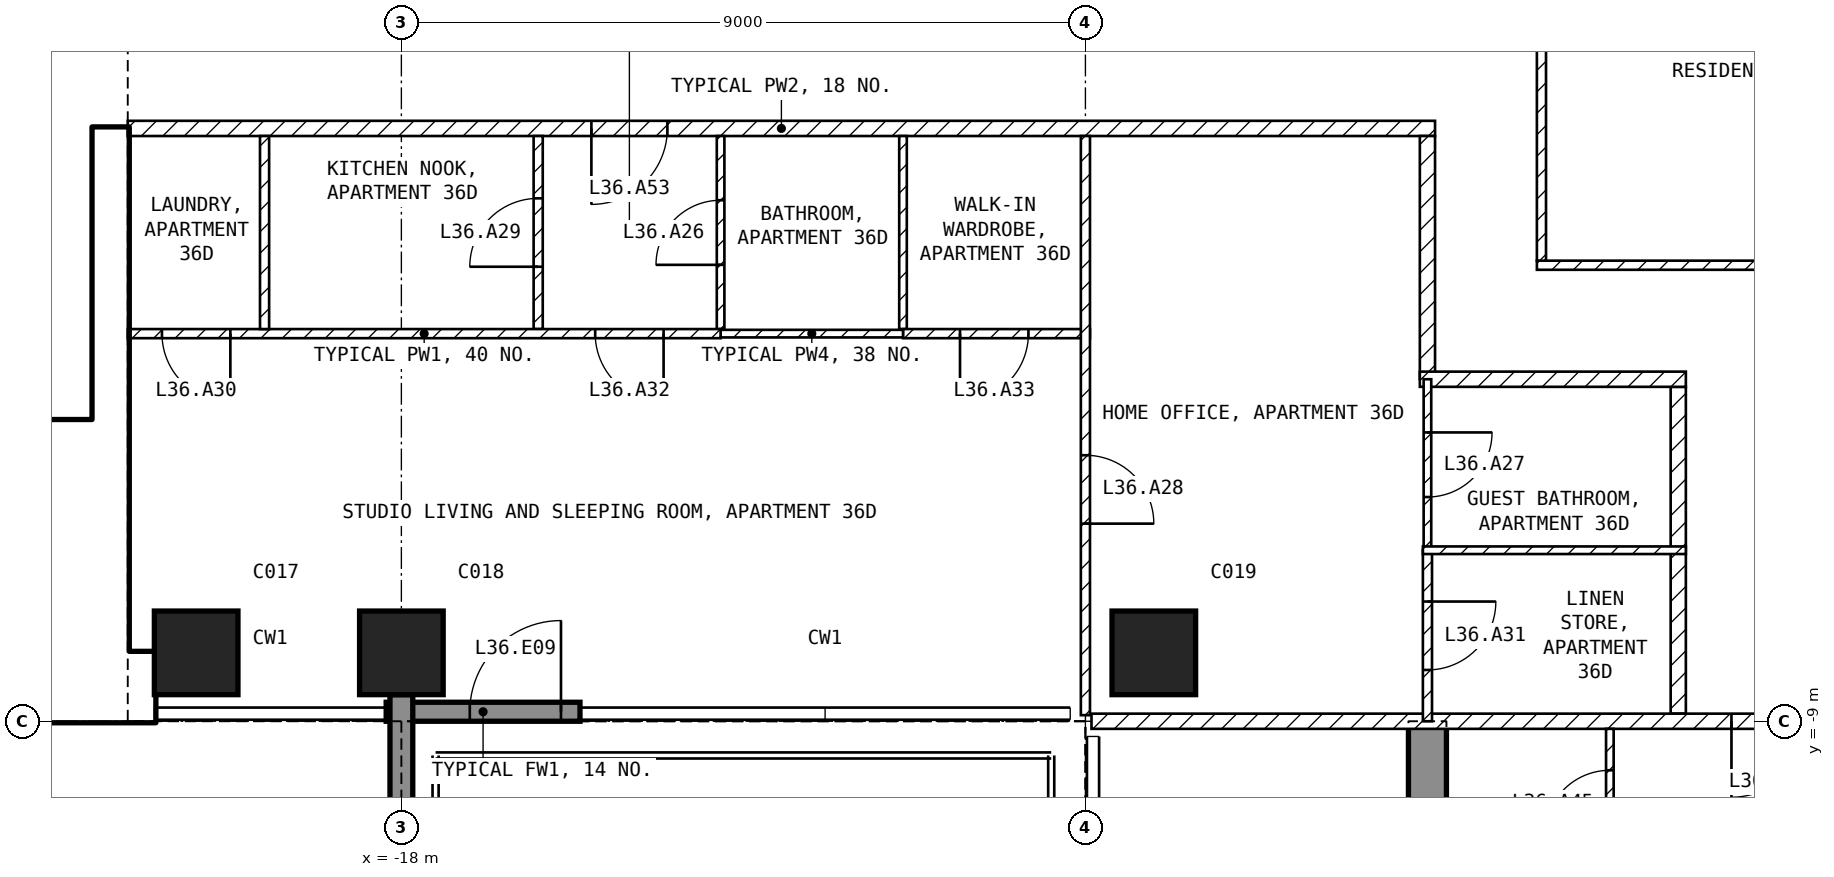
"""IFC4 building model, lengths in metres.
Left out: names, types, materials, properties, quantities, classifications, styles, units other than length and angle.
Written with IfcOpenShell. Run it as: python <this file> out.ifc"""

import sys

from ifc_helpers import new_model, si_unit, direction, frame, frame_2d, origin, origin_2d, place, context, subcontext, project, spatial, polyline, rectangle, outline, extrude, element, fill, save


model = new_model("IFC4")
c1 = context("Model", 3, precision=1e-05, world=origin(), true_north=direction((0.0, 1.0)))
c2 = subcontext(c1, "Body", "Model", "MODEL_VIEW")
j1 = project(units=[si_unit("LENGTHUNIT", "METRE"), si_unit("PLANEANGLEUNIT", "RADIAN")], contexts=[c1])
p1 = place(None, origin())
s1 = spatial("IfcSite", under=j1, at=p1, CompositionType="ELEMENT")
p2 = place(p1, origin())
s2 = spatial("IfcBuilding", under=s1, at=p2, CompositionType="ELEMENT")
p3 = place(p2, frame((0.0, 0.0, 147.9)))
s3 = spatial("IfcBuildingStorey", under=s2, at=p3, CompositionType="ELEMENT", Elevation=147.9)
for number, where, z_axis, x_axis in (
    (1, (-20.7, -8.1, -0.25), (0.0, 0.0, 1.0), (1.0, 0.0, 0.0)),
    (2, (-18.0, -8.1, -0.25), (0.0, 0.0, 1.0), (1.0, 0.0, 0.0)),
    (3, (-8.1, -8.1, -0.25), (0.0, 0.0, 1.0), (1.0, 0.0, 0.0)),
):
    element("IfcColumn", number, at=place(p3, frame(where, z_axis=z_axis, x_axis=x_axis)), inside=s3, PredefinedType="COLUMN", context=c2, shape_type="SweptSolid", body=[
        extrude(rectangle(XDim=1.1, YDim=1.1, at=origin_2d()), origin(), (0.0, 0.0, 1.0), 3.5),
    ])
p4 = place(p3, frame((-4.75, -20.15, -0.25), z_axis=(1.0, 0.0, 0.0), x_axis=(0.0, 1.0, 0.0)))
e4 = element("IfcWall", 4, at=p4, inside=s3, PredefinedType="SHEAR", context=c2, shape_type="SweptSolid", body=[
    extrude(outline(polyline([(0.0, 0.0), (6.65, 0.0), (6.65, 2.65), (9.05, 2.65), (9.05, 0.0), (11.15, 0.0), (11.15, 3.5), (0.0, 3.5), (0.0, 0.0)])), origin(), (0.0, 0.0, 1.0), 0.5),
])
p5 = place(p3, frame((-18.2, -8.875, 0.0), z_axis=(0.0, 0.0, 1.0), x_axis=(1.0, 0.0, 0.0)))
e5 = element("IfcWall", 5, at=p5, inside=s3, PredefinedType="SOLIDWALL", context=c2, shape_type="SweptSolid", body=[
    extrude(rectangle(XDim=2.55, YDim=0.25, at=frame_2d((1.275, 0.0))), origin(), (0.0, 0.0, 1.0), 3.25),
])
p6 = place(p5, frame((1.1, 0.0, 0.0)))
e6 = element("IfcOpeningElement", 6, at=p6, cuts=e5, PredefinedType="OPENING", context=c2, shape_type="SweptSolid", body=[
    extrude(rectangle(XDim=1.2, YDim=2.4, at=frame_2d((0.6, 1.2))), frame((0.0, 0.135, 0.0), z_axis=(0.0, -1.0, 0.0), x_axis=(1.0, 0.0, 0.0)), (0.0, 0.0, 1.0), 0.27),
])
p7 = place(p3, frame((-18.0, -8.65, 0.0), z_axis=(0.0, 0.0, 1.0), x_axis=(0.0, -1.0, 0.0)))
e7 = element("IfcWall", 7, at=p7, inside=s3, PredefinedType="SOLIDWALL", context=c2, shape_type="SweptSolid", body=[
    extrude(rectangle(XDim=3.09, YDim=0.3, at=frame_2d((1.545, 0.0))), origin(), (0.0, 0.0, 1.0), 3.25),
])
p8 = place(p3, frame((-30.2, -8.55, 0.0), z_axis=(0.0, 0.0, 1.0), x_axis=(1.0, 0.0, 0.0)))
e8 = element("IfcWall", 8, at=p8, inside=s3, PredefinedType="SHEAR", context=c2, shape_type="SweptSolid", body=[
    extrude(rectangle(XDim=8.95, YDim=0.9, at=frame_2d((4.475, 0.0))), origin(), (0.0, 0.0, 1.0), 3.25),
])
p9 = place(p3, frame((-21.825, -8.1, 0.0), z_axis=(0.0, 0.0, 1.0), x_axis=(0.0, 1.0, 0.0)))
e9 = element("IfcWall", 9, at=p9, inside=s3, PredefinedType="SHEAR", context=c2, shape_type="SweptSolid", body=[
    extrude(rectangle(XDim=6.9, YDim=0.45, at=frame_2d((3.45, 0.0))), origin(), (0.0, 0.0, 1.0), 3.25),
])
p10 = place(p3, frame((-28.35, -5.15, 0.0), z_axis=(0.0, 0.0, 1.0), x_axis=(1.0, 0.0, 0.0)))
e10 = element("IfcWall", 10, at=p10, inside=s3, PredefinedType="SOLIDWALL", context=c2, shape_type="SweptSolid", body=[
    extrude(rectangle(XDim=6.3, YDim=0.2, at=frame_2d((3.15, 0.0))), origin(), (0.0, 0.0, 1.0), 3.25),
])
p11 = place(p10, frame((5.1, 0.0, 0.0)))
e11 = element("IfcOpeningElement", 11, at=p11, cuts=e10, PredefinedType="OPENING", context=c2, shape_type="SweptSolid", body=[
    extrude(rectangle(XDim=1.0, YDim=2.1, at=frame_2d((0.5, 1.05))), frame((0.0, 0.11, 0.0), z_axis=(0.0, -1.0, 0.0), x_axis=(1.0, 0.0, 0.0)), (0.0, 0.0, 1.0), 0.22),
])
p12 = place(p3, frame((-3.06, -3.0, 0.0), z_axis=(0.0, 0.0, 1.0), x_axis=(1.0, 0.0, 0.0)))
e12 = element("IfcWall", 12, at=p12, inside=s3, PredefinedType="PARTITIONING", context=c2, shape_type="SweptSolid", body=[
    extrude(rectangle(XDim=6.12, YDim=0.12, at=frame_2d((3.06, 0.0))), origin(), (0.0, 0.0, 1.0), 3.25),
])
p13 = place(p3, frame((-3.0, 2.94, 0.0), z_axis=(0.0, 0.0, 1.0), x_axis=(0.0, -1.0, 0.0)))
e13 = element("IfcWall", 13, at=p13, inside=s3, PredefinedType="PARTITIONING", context=c2, shape_type="SweptSolid", body=[
    extrude(rectangle(XDim=5.88, YDim=0.12, at=frame_2d((2.94, 0.0))), origin(), (0.0, 0.0, 1.0), 3.25),
])
p14 = place(p3, frame((-4.4, -1.2, 0.0), z_axis=(0.0, 0.0, 1.0), x_axis=(-1.0, 0.0, 0.0)))
e14 = element("IfcWall", 14, at=p14, inside=s3, PredefinedType="PARTITIONING", context=c2, shape_type="SweptSolid", body=[
    extrude(rectangle(XDim=17.2, YDim=0.2, at=frame_2d((8.6, 0.0))), origin(), (0.0, 0.0, 1.0), 3.25),
])
p15 = place(p14, frame((10.1, 0.0, 0.0)))
e15 = element("IfcOpeningElement", 15, at=p15, cuts=e14, PredefinedType="OPENING", context=c2, shape_type="SweptSolid", body=[
    extrude(rectangle(XDim=1.0, YDim=2.1, at=frame_2d((0.5, 1.05))), frame((0.0, 0.11, 0.0), z_axis=(0.0, -1.0, 0.0), x_axis=(1.0, 0.0, 0.0)), (0.0, 0.0, 1.0), 0.22),
])
p16 = place(p3, frame((-4.5, -4.5, 0.0), z_axis=(0.0, 0.0, 1.0), x_axis=(0.0, 1.0, 0.0)))
e16 = element("IfcWall", 16, at=p16, inside=s3, PredefinedType="PARTITIONING", context=c2, shape_type="SweptSolid", body=[
    extrude(rectangle(XDim=3.2, YDim=0.2, at=frame_2d((1.6, 0.0))), origin(), (0.0, 0.0, 1.0), 3.25),
])
p17 = place(p3, frame((-1.2, -8.9, 0.0), z_axis=(0.0, 0.0, 1.0), x_axis=(0.0, 1.0, 0.0)))
e17 = element("IfcWall", 17, at=p17, inside=s3, PredefinedType="PARTITIONING", context=c2, shape_type="SweptSolid", body=[
    extrude(rectangle(XDim=4.3, YDim=0.2, at=frame_2d((2.15, 0.0))), origin(), (0.0, 0.0, 1.0), 3.25),
])
p18 = place(p3, frame((-1.1, -4.5, 0.0), z_axis=(0.0, 0.0, 1.0), x_axis=(-1.0, 0.0, 0.0)))
e18 = element("IfcWall", 18, at=p18, inside=s3, PredefinedType="PARTITIONING", context=c2, shape_type="SweptSolid", body=[
    extrude(rectangle(XDim=3.5, YDim=0.2, at=frame_2d((1.75, 0.0))), origin(), (0.0, 0.0, 1.0), 3.25),
])
p19 = place(p3, frame((8.92, -9.0, 0.0), z_axis=(0.0, 0.0, 1.0), x_axis=(-1.0, 0.0, 0.0)))
e19 = element("IfcWall", 19, at=p19, inside=s3, PredefinedType="PARTITIONING", context=c2, shape_type="SweptSolid", body=[
    extrude(rectangle(XDim=17.84, YDim=0.2, at=frame_2d((8.92, 0.0))), origin(), (0.0, 0.0, 1.0), 3.25),
])
p20 = place(p19, frame((8.42, 0.0, 0.0)))
e20 = element("IfcOpeningElement", 20, at=p20, cuts=e19, PredefinedType="OPENING", context=c2, shape_type="SweptSolid", body=[
    extrude(rectangle(XDim=1.0, YDim=2.1, at=frame_2d((0.5, 1.05))), frame((0.0, 0.11, 0.0), z_axis=(0.0, -1.0, 0.0), x_axis=(1.0, 0.0, 0.0)), (0.0, 0.0, 1.0), 0.22),
])
p21 = place(p3, frame((-11.4, -3.84, 0.0), z_axis=(0.0, 0.0, 1.0), x_axis=(0.0, 1.0, 0.0)))
e21 = element("IfcWall", 21, at=p21, inside=s3, PredefinedType="PARTITIONING", context=c2, shape_type="SweptSolid", body=[
    extrude(rectangle(XDim=2.54, YDim=0.1, at=frame_2d((1.27, 0.0))), origin(), (0.0, 0.0, 1.0), 3.25),
])
p22 = place(p3, frame((-8.94, -3.9, 0.0), z_axis=(0.0, 0.0, 1.0), x_axis=(-1.0, 0.0, 0.0)))
e22 = element("IfcWall", 22, at=p22, inside=s3, PredefinedType="PARTITIONING", context=c2, shape_type="SweptSolid", body=[
    extrude(rectangle(XDim=2.46, YDim=0.12, at=frame_2d((1.23, 0.0))), origin(), (0.0, 0.0, 1.0), 3.25),
])
p23 = place(p22, frame((0.81, 0.0, 0.0)))
e23 = element("IfcOpeningElement", 23, at=p23, cuts=e22, PredefinedType="OPENING", context=c2, shape_type="SweptSolid", body=[
    extrude(rectangle(XDim=0.9, YDim=2.1, at=frame_2d((0.45, 1.05))), frame((0.0, 0.07, 0.0), z_axis=(0.0, -1.0, 0.0), x_axis=(1.0, 0.0, 0.0)), (0.0, 0.0, 1.0), 0.14),
])
p24 = place(p3, frame((-9.0, -1.3, 0.0), z_axis=(0.0, 0.0, 1.0), x_axis=(0.0, -1.0, 0.0)))
e24 = element("IfcWall", 24, at=p24, inside=s3, PredefinedType="PARTITIONING", context=c2, shape_type="SweptSolid", body=[
    extrude(rectangle(XDim=7.62, YDim=0.12, at=frame_2d((3.81, 0.0))), origin(), (0.0, 0.0, 1.0), 3.25),
])
p25 = place(p24, frame((4.2, 0.0, 0.0)))
e25 = element("IfcOpeningElement", 25, at=p25, cuts=e24, PredefinedType="OPENING", context=c2, shape_type="SweptSolid", body=[
    extrude(rectangle(XDim=0.9, YDim=2.1, at=frame_2d((0.45, 1.05))), frame((0.0, 0.07, 0.0), z_axis=(0.0, -1.0, 0.0), x_axis=(1.0, 0.0, 0.0)), (0.0, 0.0, 1.0), 0.14),
])
p26 = place(p3, frame((-13.8, -3.84, 0.0), z_axis=(0.0, 0.0, 1.0), x_axis=(0.0, 1.0, 0.0)))
e26 = element("IfcWall", 26, at=p26, inside=s3, PredefinedType="PARTITIONING", context=c2, shape_type="SweptSolid", body=[
    extrude(rectangle(XDim=2.54, YDim=0.1, at=frame_2d((1.27, 0.0))), origin(), (0.0, 0.0, 1.0), 3.25),
])
p27 = place(p26, frame((0.845, 0.0, 0.0)))
e27 = element("IfcOpeningElement", 27, at=p27, cuts=e26, PredefinedType="OPENING", context=c2, shape_type="SweptSolid", body=[
    extrude(rectangle(XDim=0.85, YDim=2.1, at=frame_2d((0.425, 1.05))), frame((0.0, 0.06, 0.0), z_axis=(0.0, -1.0, 0.0), x_axis=(1.0, 0.0, 0.0)), (0.0, 0.0, 1.0), 0.12),
])
p28 = place(p3, frame((-11.4, -3.9, 0.0), z_axis=(0.0, 0.0, 1.0), x_axis=(-1.0, 0.0, 0.0)))
e28 = element("IfcWall", 28, at=p28, inside=s3, PredefinedType="PARTITIONING", context=c2, shape_type="SweptSolid", body=[
    extrude(rectangle(XDim=2.4, YDim=0.1, at=frame_2d((1.2, 0.0))), origin(), (0.0, 0.0, 1.0), 3.25),
])
p29 = place(p3, frame((-16.2, -3.84, 0.0), z_axis=(0.0, 0.0, 1.0), x_axis=(0.0, 1.0, 0.0)))
e29 = element("IfcWall", 29, at=p29, inside=s3, PredefinedType="PARTITIONING", context=c2, shape_type="SweptSolid", body=[
    extrude(rectangle(XDim=2.54, YDim=0.12, at=frame_2d((1.27, 0.0))), origin(), (0.0, 0.0, 1.0), 3.25),
])
p30 = place(p29, frame((0.82, 0.0, 0.0)))
e30 = element("IfcOpeningElement", 30, at=p30, cuts=e29, PredefinedType="OPENING", context=c2, shape_type="SweptSolid", body=[
    extrude(rectangle(XDim=0.9, YDim=2.1, at=frame_2d((0.45, 1.05))), frame((0.0, 0.07, 0.0), z_axis=(0.0, -1.0, 0.0), x_axis=(1.0, 0.0, 0.0)), (0.0, 0.0, 1.0), 0.14),
])
p31 = place(p3, frame((-13.8, -3.9, 0.0), z_axis=(0.0, 0.0, 1.0), x_axis=(-1.0, 0.0, 0.0)))
e31 = element("IfcWall", 31, at=p31, inside=s3, PredefinedType="PARTITIONING", context=c2, shape_type="SweptSolid", body=[
    extrude(rectangle(XDim=7.8, YDim=0.12, at=frame_2d((3.9, 0.0))), origin(), (0.0, 0.0, 1.0), 3.25),
])
p32 = place(p31, frame((6.45, 0.0, 0.0)))
e32 = element("IfcOpeningElement", 32, at=p32, cuts=e31, PredefinedType="OPENING", context=c2, shape_type="SweptSolid", body=[
    extrude(rectangle(XDim=0.9, YDim=2.1, at=frame_2d((0.45, 1.05))), frame((0.0, 0.07, 0.0), z_axis=(0.0, -1.0, 0.0), x_axis=(1.0, 0.0, 0.0)), (0.0, 0.0, 1.0), 0.14),
])
p33 = place(p31, frame((0.75, 0.0, 0.0)))
e33 = element("IfcOpeningElement", 33, at=p33, cuts=e31, PredefinedType="OPENING", context=c2, shape_type="SweptSolid", body=[
    extrude(rectangle(XDim=0.9, YDim=2.1, at=frame_2d((0.45, 1.05))), frame((0.0, 0.07, 0.0), z_axis=(0.0, -1.0, 0.0), x_axis=(1.0, 0.0, 0.0)), (0.0, 0.0, 1.0), 0.14),
])
p34 = place(p3, frame((-19.8, -3.84, 0.0), z_axis=(0.0, 0.0, 1.0), x_axis=(0.0, 1.0, 0.0)))
e34 = element("IfcWall", 34, at=p34, inside=s3, PredefinedType="PARTITIONING", context=c2, shape_type="SweptSolid", body=[
    extrude(rectangle(XDim=2.54, YDim=0.12, at=frame_2d((1.27, 0.0))), origin(), (0.0, 0.0, 1.0), 3.25),
])
p35 = place(p3, frame((-4.5, -4.5, 0.0), z_axis=(0.0, 0.0, 1.0), x_axis=(0.0, -1.0, 0.0)))
e35 = element("IfcWall", 35, at=p35, inside=s3, PredefinedType="PARTITIONING", context=c2, shape_type="SweptSolid", body=[
    extrude(rectangle(XDim=2.25, YDim=0.1, at=frame_2d((1.125, 0.0))), origin(), (0.0, 0.0, 1.0), 3.25),
])
p36 = place(p35, frame((0.7, 0.0, 0.0)))
e36 = element("IfcOpeningElement", 36, at=p36, cuts=e35, PredefinedType="OPENING", context=c2, shape_type="SweptSolid", body=[
    extrude(rectangle(XDim=0.85, YDim=2.1, at=frame_2d((0.425, 1.05))), frame((0.0, 0.06, 0.0), z_axis=(0.0, -1.0, 0.0), x_axis=(1.0, 0.0, 0.0)), (0.0, 0.0, 1.0), 0.12),
])
p37 = place(p3, frame((-4.5, -6.75, 0.0), z_axis=(0.0, 0.0, 1.0), x_axis=(0.0, -1.0, 0.0)))
e37 = element("IfcWall", 37, at=p37, inside=s3, PredefinedType="PARTITIONING", context=c2, shape_type="SweptSolid", body=[
    extrude(rectangle(XDim=2.25, YDim=0.12, at=frame_2d((1.125, 0.0))), origin(), (0.0, 0.0, 1.0), 3.25),
])
p38 = place(p37, frame((0.675, 0.0, 0.0)))
e38 = element("IfcOpeningElement", 38, at=p38, cuts=e37, PredefinedType="OPENING", context=c2, shape_type="SweptSolid", body=[
    extrude(rectangle(XDim=0.9, YDim=2.1, at=frame_2d((0.45, 1.05))), frame((0.0, 0.07, 0.0), z_axis=(0.0, -1.0, 0.0), x_axis=(1.0, 0.0, 0.0)), (0.0, 0.0, 1.0), 0.14),
])
p39 = place(p3, frame((-1.1, -6.75, 0.0), z_axis=(0.0, 0.0, 1.0), x_axis=(-1.0, 0.0, 0.0)))
e39 = element("IfcWall", 39, at=p39, inside=s3, PredefinedType="PARTITIONING", context=c2, shape_type="SweptSolid", body=[
    extrude(rectangle(XDim=3.46, YDim=0.1, at=frame_2d((1.73, 0.0))), origin(), (0.0, 0.0, 1.0), 3.25),
])
p40 = place(p3, frame((-2.1, -11.04, 0.0), z_axis=(0.0, 0.0, 1.0), x_axis=(0.0, 1.0, 0.0)))
e40 = element("IfcWall", 40, at=p40, inside=s3, PredefinedType="PARTITIONING", context=c2, shape_type="SweptSolid", body=[
    extrude(rectangle(XDim=1.94, YDim=0.1, at=frame_2d((0.97, 0.0))), origin(), (0.0, 0.0, 1.0), 3.25),
])
p41 = place(p40, frame((0.545, 0.0, 0.0)))
e41 = element("IfcOpeningElement", 41, at=p41, cuts=e40, PredefinedType="OPENING", context=c2, shape_type="SweptSolid", body=[
    extrude(rectangle(XDim=0.85, YDim=2.1, at=frame_2d((0.425, 1.05))), frame((0.0, 0.06, 0.0), z_axis=(0.0, -1.0, 0.0), x_axis=(1.0, 0.0, 0.0)), (0.0, 0.0, 1.0), 0.12),
])
p42 = place(p6, origin())
e42 = element("IfcDoor", 42, at=p42, inside=s3, OperationType="SINGLE_SWING_RIGHT", PredefinedType="DOOR", context=c2, shape_type="SweptSolid", body=[
    extrude(rectangle(XDim=1.2, YDim=2.4, at=frame_2d((0.6, 1.2))), frame((0.0, 0.025, 0.0), z_axis=(0.0, -1.0, 0.0), x_axis=(1.0, 0.0, 0.0)), (0.0, 0.0, 1.0), 0.05),
])
fill(e6, e42)
p43 = place(p11, origin())
e43 = element("IfcDoor", 43, at=p43, inside=s3, OperationType="SINGLE_SWING_LEFT", PredefinedType="DOOR", context=c2, shape_type="SweptSolid", body=[
    extrude(rectangle(XDim=1.0, YDim=2.1, at=frame_2d((0.5, 1.05))), frame((0.0, 0.025, 0.0), z_axis=(0.0, -1.0, 0.0), x_axis=(1.0, 0.0, 0.0)), (0.0, 0.0, 1.0), 0.05),
])
fill(e11, e43)
p44 = place(p27, origin())
e44 = element("IfcDoor", 44, at=p44, inside=s3, OperationType="SINGLE_SWING_LEFT", PredefinedType="DOOR", context=c2, shape_type="SweptSolid", body=[
    extrude(rectangle(XDim=0.85, YDim=2.1, at=frame_2d((0.425, 1.05))), frame((0.0, 0.025, 0.0), z_axis=(0.0, -1.0, 0.0), x_axis=(1.0, 0.0, 0.0)), (0.0, 0.0, 1.0), 0.05),
])
fill(e27, e44)
p45 = place(p36, origin())
e45 = element("IfcDoor", 45, at=p45, inside=s3, OperationType="SINGLE_SWING_LEFT", PredefinedType="DOOR", context=c2, shape_type="SweptSolid", body=[
    extrude(rectangle(XDim=0.85, YDim=2.1, at=frame_2d((0.425, 1.05))), frame((0.0, 0.025, 0.0), z_axis=(0.0, -1.0, 0.0), x_axis=(1.0, 0.0, 0.0)), (0.0, 0.0, 1.0), 0.05),
])
fill(e36, e45)
p46 = place(p25, origin())
e46 = element("IfcDoor", 46, at=p46, inside=s3, OperationType="SINGLE_SWING_RIGHT", PredefinedType="DOOR", context=c2, shape_type="SweptSolid", body=[
    extrude(rectangle(XDim=0.9, YDim=2.1, at=frame_2d((0.45, 1.05))), frame((0.0, 0.025, 0.0), z_axis=(0.0, -1.0, 0.0), x_axis=(1.0, 0.0, 0.0)), (0.0, 0.0, 1.0), 0.05),
])
fill(e25, e46)
p47 = place(p30, origin())
e47 = element("IfcDoor", 47, at=p47, inside=s3, OperationType="SINGLE_SWING_LEFT", PredefinedType="DOOR", context=c2, shape_type="SweptSolid", body=[
    extrude(rectangle(XDim=0.9, YDim=2.1, at=frame_2d((0.45, 1.05))), frame((0.0, 0.025, 0.0), z_axis=(0.0, -1.0, 0.0), x_axis=(1.0, 0.0, 0.0)), (0.0, 0.0, 1.0), 0.05),
])
fill(e30, e47)
p48 = place(p32, origin())
e48 = element("IfcDoor", 48, at=p48, inside=s3, OperationType="SINGLE_SWING_LEFT", PredefinedType="DOOR", context=c2, shape_type="SweptSolid", body=[
    extrude(rectangle(XDim=0.9, YDim=2.1, at=frame_2d((0.45, 1.05))), frame((0.0, 0.025, 0.0), z_axis=(0.0, -1.0, 0.0), x_axis=(1.0, 0.0, 0.0)), (0.0, 0.0, 1.0), 0.05),
])
fill(e32, e48)
p49 = place(p38, origin())
e49 = element("IfcDoor", 49, at=p49, inside=s3, OperationType="SINGLE_SWING_LEFT", PredefinedType="DOOR", context=c2, shape_type="SweptSolid", body=[
    extrude(rectangle(XDim=0.9, YDim=2.1, at=frame_2d((0.45, 1.05))), frame((0.0, 0.025, 0.0), z_axis=(0.0, -1.0, 0.0), x_axis=(1.0, 0.0, 0.0)), (0.0, 0.0, 1.0), 0.05),
])
fill(e38, e49)
p50 = place(p33, origin())
e50 = element("IfcDoor", 50, at=p50, inside=s3, OperationType="SINGLE_SWING_LEFT", PredefinedType="DOOR", context=c2, shape_type="SweptSolid", body=[
    extrude(rectangle(XDim=0.9, YDim=2.1, at=frame_2d((0.45, 1.05))), frame((0.0, 0.025, 0.0), z_axis=(0.0, -1.0, 0.0), x_axis=(1.0, 0.0, 0.0)), (0.0, 0.0, 1.0), 0.05),
])
fill(e33, e50)
p51 = place(p23, origin())
e51 = element("IfcDoor", 51, at=p51, inside=s3, OperationType="SINGLE_SWING_RIGHT", PredefinedType="DOOR", context=c2, shape_type="SweptSolid", body=[
    extrude(rectangle(XDim=0.9, YDim=2.1, at=frame_2d((0.45, 1.05))), frame((0.0, 0.025, 0.0), z_axis=(0.0, -1.0, 0.0), x_axis=(1.0, 0.0, 0.0)), (0.0, 0.0, 1.0), 0.05),
])
fill(e23, e51)
p52 = place(p20, origin())
e52 = element("IfcDoor", 52, at=p52, inside=s3, OperationType="SINGLE_SWING_RIGHT", PredefinedType="DOOR", context=c2, shape_type="SweptSolid", body=[
    extrude(rectangle(XDim=1.0, YDim=2.1, at=frame_2d((0.5, 1.05))), frame((0.0, 0.025, 0.0), z_axis=(0.0, -1.0, 0.0), x_axis=(1.0, 0.0, 0.0)), (0.0, 0.0, 1.0), 0.05),
])
fill(e20, e52)
p53 = place(p41, origin())
e53 = element("IfcDoor", 53, at=p53, inside=s3, OperationType="SINGLE_SWING_LEFT", PredefinedType="DOOR", context=c2, shape_type="SweptSolid", body=[
    extrude(rectangle(XDim=0.85, YDim=2.1, at=frame_2d((0.425, 1.05))), frame((0.0, 0.025, 0.0), z_axis=(0.0, -1.0, 0.0), x_axis=(1.0, 0.0, 0.0)), (0.0, 0.0, 1.0), 0.05),
])
fill(e41, e53)
p54 = place(p15, origin())
e54 = element("IfcDoor", 54, at=p54, inside=s3, OperationType="SINGLE_SWING_RIGHT", PredefinedType="DOOR", context=c2, shape_type="SweptSolid", body=[
    extrude(rectangle(XDim=1.0, YDim=2.1, at=frame_2d((0.5, 1.05))), frame((0.0, 0.025, 0.0), z_axis=(0.0, -1.0, 0.0), x_axis=(1.0, 0.0, 0.0)), (0.0, 0.0, 1.0), 0.05),
])
fill(e15, e54)
save(model, sys.argv[1])
